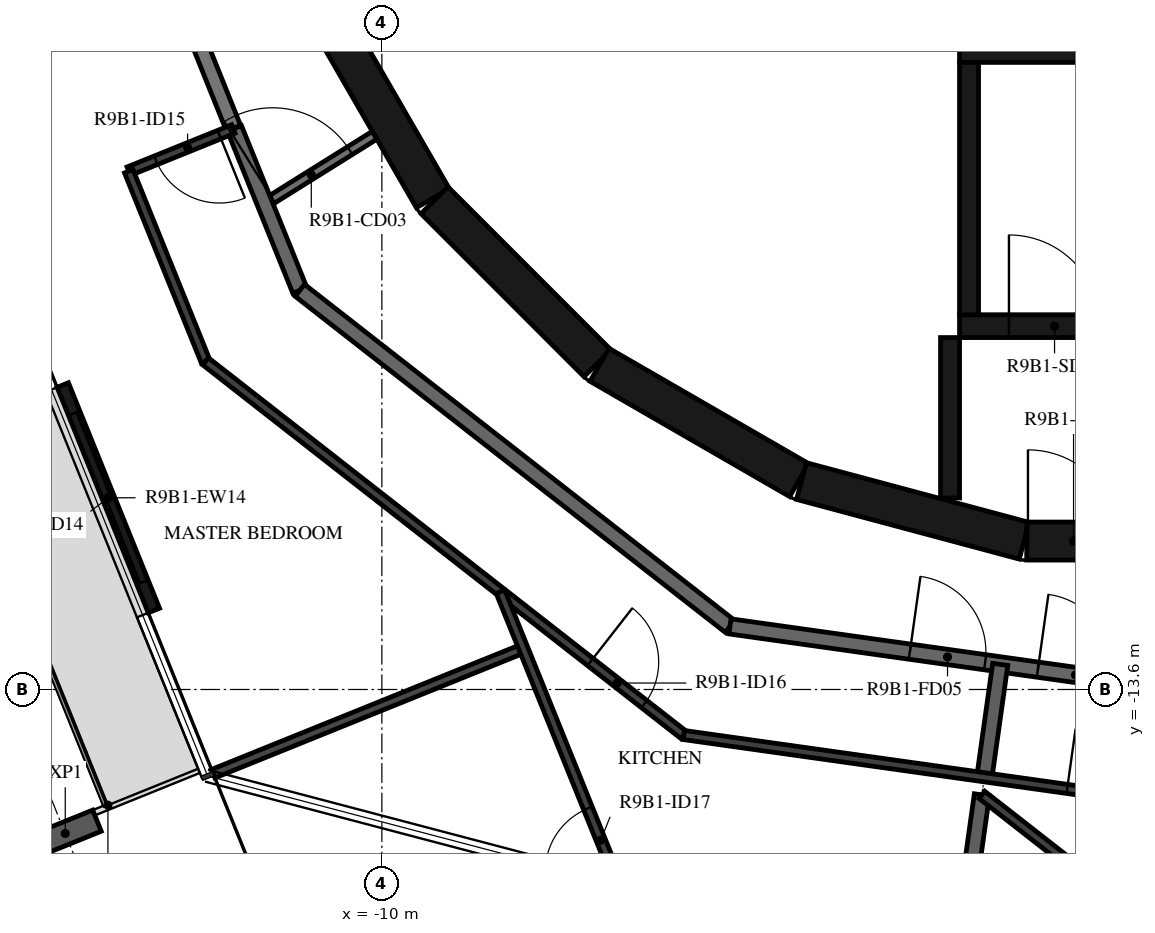
"""IFC4 building model, lengths in metres.
Left out: names, types, materials, properties, quantities, classifications, styles, units other than length and angle.
Written with IfcOpenShell. Run it as: python <this file> out.ifc"""

import sys

from ifc_helpers import new_model, si_unit, direction, frame, frame_2d, origin, origin_2d, place, context, subcontext, project, spatial, rectangle, i_section, extrude, element, fill, save


model = new_model("IFC4")
c1 = context("Model", 3, precision=1e-05, world=origin(), true_north=direction((0.0, 1.0)))
c2 = subcontext(c1, "Body", "Model", "MODEL_VIEW")
j1 = project(units=[si_unit("LENGTHUNIT", "METRE"), si_unit("PLANEANGLEUNIT", "RADIAN")], contexts=[c1])
p1 = place(None, origin())
s1 = spatial("IfcSite", under=j1, at=p1, CompositionType="ELEMENT")
p2 = place(p1, origin())
s2 = spatial("IfcBuilding", under=s1, at=p2, CompositionType="ELEMENT")
p3 = place(p2, frame((0.0, 0.0, 350.5)))
s3 = spatial("IfcBuildingStorey", under=s2, at=p3, CompositionType="ELEMENT", Elevation=350.5)
p4 = place(p3, frame((-14.166, -15.495, -0.38), z_axis=(0.0, 0.0, 1.0), x_axis=(-0.374606892434, 0.927183733755, 0.0)))
e1 = element("IfcColumn", 1, at=p4, inside=s3, PredefinedType="COLUMN", context=c2, shape_type="SweptSolid", body=[
    extrude(i_section(OverallWidth=0.3, OverallDepth=0.9, WebThickness=0.019, FlangeThickness=0.035, FilletRadius=0.03, at=origin_2d()), origin(), (0.0, 0.0, 1.0), 3.5),
])
p5 = place(p3, frame((-14.198, -9.594, 0.0), z_axis=(0.0, 0.0, 1.0), x_axis=(0.374624519695, -0.927176611678, 0.0)))
e2 = element("IfcWall", 2, at=p5, inside=s3, PredefinedType="STANDARD", context=c2, shape_type="SweptSolid", body=[
    extrude(rectangle(XDim=3.2, YDim=0.16, at=frame_2d((1.6, 0.0))), origin(), (0.0, 0.0, 1.0), 3.12),
])
p6 = place(p5, frame((0.4, 0.0, 0.0)))
e3 = element("IfcOpeningElement", 3, at=p6, cuts=e2, PredefinedType="OPENING", context=c2, shape_type="SweptSolid", body=[
    extrude(rectangle(XDim=2.4, YDim=2.4, at=frame_2d((1.2, 1.2))), frame((0.0, 0.09, 0.0), z_axis=(0.0, -1.0, 0.0), x_axis=(1.0, 0.0, 0.0)), (0.0, 0.0, 1.0), 0.18),
])
p7 = place(p3, frame((-10.845, -4.51, 0.0), z_axis=(0.0, 0.0, 1.0), x_axis=(0.500087131594, -0.865975092491, 0.0)))
e4 = element("IfcWall", 4, at=p7, inside=s3, PredefinedType="SHEAR", context=c2, shape_type="SweptSolid", body=[
    extrude(rectangle(XDim=3.033, YDim=0.5, at=frame_2d((1.516, 0.0))), origin(), (0.0, 0.0, 1.0), 3.12),
])
p8 = place(p3, frame((-9.308, -7.164, 0.0), z_axis=(0.0, 0.0, 1.0), x_axis=(0.707106781187, -0.707106781187, 0.0)))
e5 = element("IfcWall", 5, at=p8, inside=s3, PredefinedType="SHEAR", context=c2, shape_type="SweptSolid", body=[
    extrude(rectangle(XDim=3.032, YDim=0.5, at=frame_2d((1.516, 0.0))), origin(), (0.0, 0.0, 1.0), 3.12),
])
for number, where, z_axis, x_axis in (
    (6, (-7.137, -9.329, 0.0), (0.0, 0.0, 1.0), (0.866, -0.5, 0.0)),
    (7, (-4.479, -10.858, 0.0), (0.0, 0.0, 1.0), (0.966, -0.259, 0.0)),
):
    element("IfcWall", number, at=place(p3, frame(where, z_axis=z_axis, x_axis=x_axis)), inside=s3, PredefinedType="SHEAR", context=c2, shape_type="SweptSolid", body=[
        extrude(rectangle(XDim=3.033, YDim=0.5, at=frame_2d((1.516, 0.0))), origin(), (0.0, 0.0, 1.0), 3.12),
    ])
p9 = place(p3, frame((-1.516, -11.647, 0.0), z_axis=(0.0, 0.0, 1.0), x_axis=(1.0, 0.0, 0.0)))
e8 = element("IfcWall", 8, at=p9, inside=s3, PredefinedType="SHEAR", context=c2, shape_type="SweptSolid", body=[
    extrude(rectangle(XDim=3.033, YDim=0.5, at=frame_2d((1.516, 0.0))), origin(), (0.0, 0.0, 1.0), 3.12),
])
p10 = place(p9, frame((0.016, 0.0, 0.0)))
e9 = element("IfcOpeningElement", 9, at=p10, cuts=e8, PredefinedType="OPENING", context=c2, shape_type="SweptSolid", body=[
    extrude(rectangle(XDim=1.2, YDim=2.1, at=frame_2d((0.6, 1.05))), frame((0.0, 0.26, 0.0), z_axis=(0.0, -1.0, 0.0), x_axis=(1.0, 0.0, 0.0)), (0.0, 0.0, 1.0), 0.52),
])
p11 = place(p3, frame((-2.275, -8.67, 0.0), z_axis=(0.0, 0.0, 1.0), x_axis=(0.0, 1.0, 0.0)))
e10 = element("IfcWall", 10, at=p11, inside=s3, PredefinedType="SHEAR", context=c2, shape_type="SweptSolid", body=[
    extrude(rectangle(XDim=3.32, YDim=0.25, at=frame_2d((1.66, 0.0))), origin(), (0.0, 0.0, 1.0), 3.12),
])
p12 = place(p3, frame((-2.4, -5.2, 0.0), z_axis=(0.0, 0.0, 1.0), x_axis=(1.0, 0.0, 0.0)))
e11 = element("IfcWall", 11, at=p12, inside=s3, PredefinedType="SHEAR", context=c2, shape_type="SweptSolid", body=[
    extrude(rectangle(XDim=7.05, YDim=0.3, at=frame_2d((3.525, 0.0))), origin(), (0.0, 0.0, 1.0), 3.12),
])
p13 = place(p3, frame((-2.4, -8.82, 0.0), z_axis=(0.0, 0.0, 1.0), x_axis=(1.0, 0.0, 0.0)))
e12 = element("IfcWall", 12, at=p13, inside=s3, PredefinedType="SHEAR", context=c2, shape_type="SweptSolid", body=[
    extrude(rectangle(XDim=2.5, YDim=0.3, at=frame_2d((1.25, 0.0))), origin(), (0.0, 0.0, 1.0), 3.12),
])
p14 = place(p13, frame((0.65, 0.0, 0.0)))
e13 = element("IfcOpeningElement", 13, at=p14, cuts=e12, PredefinedType="OPENING", context=c2, shape_type="SweptSolid", body=[
    extrude(rectangle(XDim=1.2, YDim=2.1, at=frame_2d((0.6, 1.05))), frame((0.0, 0.16, 0.0), z_axis=(0.0, -1.0, 0.0), x_axis=(1.0, 0.0, 0.0)), (0.0, 0.0, 1.0), 0.32),
])
p15 = place(p3, frame((-2.525, -8.97, 0.0), z_axis=(0.0, 0.0, 1.0), x_axis=(0.0, -1.0, 0.0)))
e14 = element("IfcWall", 14, at=p15, inside=s3, PredefinedType="SHEAR", context=c2, shape_type="SweptSolid", body=[
    extrude(rectangle(XDim=2.11, YDim=0.25, at=frame_2d((1.055, 0.0))), origin(), (0.0, 0.0, 1.0), 3.12),
])
p16 = place(p3, frame((-11.539, -7.21, 0.0), z_axis=(0.0, 0.0, 1.0), x_axis=(0.848103039868, 0.529831325769, 0.0)))
e15 = element("IfcWall", 15, at=p16, inside=s3, PredefinedType="PARTITIONING", context=c2, shape_type="SweptSolid", body=[
    extrude(rectangle(XDim=1.702, YDim=0.12, at=frame_2d((0.851, 0.0))), origin(), (0.0, 0.0, 1.0), 3.12),
])
p17 = place(p16, frame((0.12, 0.0, 0.0)))
e16 = element("IfcOpeningElement", 16, at=p17, cuts=e15, PredefinedType="OPENING", context=c2, shape_type="SweptSolid", body=[
    extrude(rectangle(XDim=1.2, YDim=2.1, at=frame_2d((0.6, 1.05))), frame((0.0, 0.07, 0.0), z_axis=(0.0, -1.0, 0.0), x_axis=(1.0, 0.0, 0.0)), (0.0, 0.0, 1.0), 0.14),
])
p18 = place(p3, frame((-13.769, -1.691, 0.0), z_axis=(0.0, 0.0, 1.0), x_axis=(0.372720094028, -0.927943819155, 0.0)))
e17 = element("IfcWall", 17, at=p18, inside=s3, PredefinedType="STANDARD", context=c2, shape_type="SweptSolid", body=[
    extrude(rectangle(XDim=4.875, YDim=0.2, at=frame_2d((2.438, 0.0))), origin(), (0.0, 0.0, 1.0), 3.12),
])
p19 = place(p3, frame((-11.939, -6.22, 0.0), z_axis=(0.0, 0.0, 1.0), x_axis=(0.374651128394, -0.927165860024, 0.0)))
e18 = element("IfcWall", 18, at=p19, inside=s3, PredefinedType="STANDARD", context=c2, shape_type="SweptSolid", body=[
    extrude(rectangle(XDim=2.296, YDim=0.2, at=frame_2d((1.148, 0.0))), origin(), (0.0, 0.0, 1.0), 3.12),
])
p20 = place(p3, frame((-11.079, -8.349, 0.0), z_axis=(0.0, 0.0, 1.0), x_axis=(0.78800478687, -0.615669112324, 0.0)))
e19 = element("IfcWall", 19, at=p20, inside=s3, PredefinedType="STANDARD", context=c2, shape_type="SweptSolid", body=[
    extrude(rectangle(XDim=7.181, YDim=0.2, at=frame_2d((3.591, 0.0))), origin(), (0.0, 0.0, 1.0), 3.12),
])
p21 = place(p3, frame((-5.42, -12.77, 0.0), z_axis=(0.0, 0.0, 1.0), x_axis=(0.990270565508, -0.139155334385, 0.0)))
e20 = element("IfcWall", 20, at=p21, inside=s3, PredefinedType="STANDARD", context=c2, shape_type="SweptSolid", body=[
    extrude(rectangle(XDim=7.181, YDim=0.2, at=frame_2d((3.59, 0.0))), origin(), (0.0, 0.0, 1.0), 3.12),
])
p22 = place(p21, frame((2.39, 0.0, 0.0)))
e21 = element("IfcOpeningElement", 21, at=p22, cuts=e20, PredefinedType="OPENING", context=c2, shape_type="SweptSolid", body=[
    extrude(rectangle(XDim=1.0, YDim=2.1, at=frame_2d((0.5, 1.05))), frame((0.0, 0.11, 0.0), z_axis=(0.0, -1.0, 0.0), x_axis=(1.0, 0.0, 0.0)), (0.0, 0.0, 1.0), 0.22),
])
p23 = place(p21, frame((4.091, 0.0, 0.0)))
e22 = element("IfcOpeningElement", 22, at=p23, cuts=e20, PredefinedType="OPENING", context=c2, shape_type="SweptSolid", body=[
    extrude(rectangle(XDim=1.0, YDim=2.1, at=frame_2d((0.5, 1.05))), frame((0.0, 0.11, 0.0), z_axis=(0.0, -1.0, 0.0), x_axis=(1.0, 0.0, 0.0)), (0.0, 0.0, 1.0), 0.22),
])
p24 = place(p3, frame((-2.073, -14.755, 0.0), z_axis=(0.0, 0.0, 1.0), x_axis=(0.139005431033, 0.990291618738, 0.0)))
e23 = element("IfcWall", 23, at=p24, inside=s3, PredefinedType="STANDARD", context=c2, shape_type="SweptSolid", body=[
    extrude(rectangle(XDim=1.5, YDim=0.2, at=frame_2d((0.75, 0.0))), origin(), (0.0, 0.0, 1.0), 3.12),
])
p25 = place(p3, frame((-2.256, -16.055, 0.0), z_axis=(0.0, 0.0, 1.0), x_axis=(0.139109268657, 0.990277037689, 0.0)))
e24 = element("IfcWall", 24, at=p25, inside=s3, PredefinedType="STANDARD", context=c2, shape_type="SweptSolid", body=[
    extrude(rectangle(XDim=1.079, YDim=0.2, at=frame_2d((0.54, 0.0))), origin(), (0.0, 0.0, 1.0), 3.12),
])
p26 = place(p3, frame((-11.953, -6.225, 0.0), z_axis=(0.0, 0.0, 1.0), x_axis=(-0.927144096717, -0.374704982518, 0.0)))
e25 = element("IfcWall", 25, at=p26, inside=s3, PredefinedType="PARTITIONING", context=c2, shape_type="SweptSolid", body=[
    extrude(rectangle(XDim=1.485, YDim=0.12, at=frame_2d((0.742, 0.0))), origin(), (0.0, 0.0, 1.0), 3.12),
])
p27 = place(p26, frame((0.2, 0.0, 0.0)))
e26 = element("IfcOpeningElement", 26, at=p27, cuts=e25, PredefinedType="OPENING", context=c2, shape_type="SweptSolid", body=[
    extrude(rectangle(XDim=0.9, YDim=2.1, at=frame_2d((0.45, 1.05))), frame((0.0, 0.07, 0.0), z_axis=(0.0, -1.0, 0.0), x_axis=(1.0, 0.0, 0.0)), (0.0, 0.0, 1.0), 0.14),
])
p28 = place(p3, frame((-13.33, -6.782, 0.0), z_axis=(0.0, 0.0, 1.0), x_axis=(0.374602180132, -0.927185637637, 0.0)))
e27 = element("IfcWall", 27, at=p28, inside=s3, PredefinedType="PARTITIONING", context=c2, shape_type="SweptSolid", body=[
    extrude(rectangle(XDim=2.698, YDim=0.12, at=frame_2d((1.349, 0.0))), origin(), (0.0, 0.0, 1.0), 3.12),
])
p29 = place(p3, frame((-12.319, -9.283, 0.0), z_axis=(0.0, 0.0, 1.0), x_axis=(0.788000268464, -0.61567489546, 0.0)))
e28 = element("IfcWall", 28, at=p29, inside=s3, PredefinedType="PARTITIONING", context=c2, shape_type="SweptSolid", body=[
    extrude(rectangle(XDim=7.985, YDim=0.12, at=frame_2d((3.992, 0.0))), origin(), (0.0, 0.0, 1.0), 3.12),
])
p30 = place(p29, frame((6.423, 0.0, 0.0)))
e29 = element("IfcOpeningElement", 29, at=p30, cuts=e28, PredefinedType="OPENING", context=c2, shape_type="SweptSolid", body=[
    extrude(rectangle(XDim=0.9, YDim=2.1, at=frame_2d((0.45, 1.05))), frame((0.0, 0.07, 0.0), z_axis=(0.0, -1.0, 0.0), x_axis=(1.0, 0.0, 0.0)), (0.0, 0.0, 1.0), 0.14),
])
p31 = place(p3, frame((-6.027, -14.199, 0.0), z_axis=(0.0, 0.0, 1.0), x_axis=(0.990271617837, -0.139147845494, 0.0)))
e30 = element("IfcWall", 30, at=p31, inside=s3, PredefinedType="PARTITIONING", context=c2, shape_type="SweptSolid", body=[
    extrude(rectangle(XDim=7.308, YDim=0.12, at=frame_2d((3.654, 0.0))), origin(), (0.0, 0.0, 1.0), 3.12),
])
p32 = place(p31, frame((5.093, 0.0, 0.0)))
e31 = element("IfcOpeningElement", 31, at=p32, cuts=e30, PredefinedType="OPENING", context=c2, shape_type="SweptSolid", body=[
    extrude(rectangle(XDim=0.8, YDim=2.1, at=frame_2d((0.4, 1.05))), frame((0.0, 0.07, 0.0), z_axis=(0.0, -1.0, 0.0), x_axis=(1.0, 0.0, 0.0)), (0.0, 0.0, 1.0), 0.14),
])
p33 = place(p3, frame((-12.219, -14.708, 0.0), z_axis=(0.0, 0.0, 1.0), x_axis=(0.927189216671, 0.374593321469, 0.0)))
e32 = element("IfcWall", 32, at=p33, inside=s3, PredefinedType="PARTITIONING", context=c2, shape_type="SweptSolid", body=[
    extrude(rectangle(XDim=4.4, YDim=0.12, at=frame_2d((2.2, 0.0))), origin(), (0.0, 0.0, 1.0), 2.73),
])
p34 = place(p3, frame((-5.894, -18.616, 0.0), z_axis=(0.0, 0.0, 1.0), x_axis=(-0.374596683143, 0.927187858515, 0.0)))
e33 = element("IfcWall", 33, at=p34, inside=s3, PredefinedType="PARTITIONING", context=c2, shape_type="SweptSolid", body=[
    extrude(rectangle(XDim=6.796, YDim=0.12, at=frame_2d((3.398, 0.0))), origin(), (0.0, 0.0, 1.0), 3.12),
])
p35 = place(p34, frame((2.822, 0.0, 0.0)))
e34 = element("IfcOpeningElement", 34, at=p35, cuts=e33, PredefinedType="OPENING", context=c2, shape_type="SweptSolid", body=[
    extrude(rectangle(XDim=0.9, YDim=2.1, at=frame_2d((0.45, 1.05))), frame((0.0, 0.07, 0.0), z_axis=(0.0, -1.0, 0.0), x_axis=(1.0, 0.0, 0.0)), (0.0, 0.0, 1.0), 0.14),
])
p36 = place(p3, frame((2.363, -18.478, 0.0), z_axis=(0.0, 0.0, 1.0), x_axis=(-0.788010669333, 0.615661583191, 0.0)))
e35 = element("IfcWall", 35, at=p36, inside=s3, PredefinedType="PARTITIONING", context=c2, shape_type="SweptSolid", body=[
    extrude(rectangle(XDim=5.672, YDim=0.12, at=frame_2d((2.836, 0.0))), origin(), (0.0, 0.0, 1.0), 3.12),
])
p37 = place(p6, origin())
e36 = element("IfcDoor", 36, at=p37, inside=s3, OperationType="DOUBLE_DOOR_SLIDING", PredefinedType="DOOR", context=c2, shape_type="SweptSolid", body=[
    extrude(rectangle(XDim=2.4, YDim=2.4, at=frame_2d((1.2, 1.2))), frame((0.0, 0.025, 0.0), z_axis=(0.0, -1.0, 0.0), x_axis=(1.0, 0.0, 0.0)), (0.0, 0.0, 1.0), 0.05),
])
fill(e3, e36)
p38 = place(p14, origin())
e37 = element("IfcDoor", 37, at=p38, inside=s3, OperationType="SINGLE_SWING_LEFT", PredefinedType="DOOR", context=c2, shape_type="SweptSolid", body=[
    extrude(rectangle(XDim=1.2, YDim=2.1, at=frame_2d((0.6, 1.05))), frame((0.0, 0.025, 0.0), z_axis=(0.0, -1.0, 0.0), x_axis=(1.0, 0.0, 0.0)), (0.0, 0.0, 1.0), 0.05),
])
fill(e13, e37)
p39 = place(p10, origin())
e38 = element("IfcDoor", 38, at=p39, inside=s3, OperationType="SINGLE_SWING_RIGHT", PredefinedType="DOOR", context=c2, shape_type="SweptSolid", body=[
    extrude(rectangle(XDim=1.2, YDim=2.1, at=frame_2d((0.6, 1.05))), frame((0.0, 0.025, 0.0), z_axis=(0.0, -1.0, 0.0), x_axis=(1.0, 0.0, 0.0)), (0.0, 0.0, 1.0), 0.05),
])
fill(e9, e38)
p40 = place(p22, origin())
e39 = element("IfcDoor", 39, at=p40, inside=s3, OperationType="SINGLE_SWING_RIGHT", PredefinedType="DOOR", context=c2, shape_type="SweptSolid", body=[
    extrude(rectangle(XDim=1.0, YDim=2.1, at=frame_2d((0.5, 1.05))), frame((0.0, 0.025, 0.0), z_axis=(0.0, -1.0, 0.0), x_axis=(1.0, 0.0, 0.0)), (0.0, 0.0, 1.0), 0.05),
])
fill(e21, e39)
p41 = place(p27, origin())
e40 = element("IfcDoor", 40, at=p41, inside=s3, OperationType="SINGLE_SWING_LEFT", PredefinedType="DOOR", context=c2, shape_type="SweptSolid", body=[
    extrude(rectangle(XDim=0.9, YDim=2.1, at=frame_2d((0.45, 1.05))), frame((0.0, 0.025, 0.0), z_axis=(0.0, -1.0, 0.0), x_axis=(1.0, 0.0, 0.0)), (0.0, 0.0, 1.0), 0.05),
])
fill(e26, e40)
p42 = place(p30, origin())
e41 = element("IfcDoor", 41, at=p42, inside=s3, OperationType="SINGLE_SWING_RIGHT", PredefinedType="DOOR", context=c2, shape_type="SweptSolid", body=[
    extrude(rectangle(XDim=0.9, YDim=2.1, at=frame_2d((0.45, 1.05))), frame((0.0, 0.025, 0.0), z_axis=(0.0, -1.0, 0.0), x_axis=(1.0, 0.0, 0.0)), (0.0, 0.0, 1.0), 0.05),
])
fill(e29, e41)
p43 = place(p35, origin())
e42 = element("IfcDoor", 42, at=p43, inside=s3, OperationType="SINGLE_SWING_RIGHT", PredefinedType="DOOR", context=c2, shape_type="SweptSolid", body=[
    extrude(rectangle(XDim=0.9, YDim=2.1, at=frame_2d((0.45, 1.05))), frame((0.0, 0.025, 0.0), z_axis=(0.0, -1.0, 0.0), x_axis=(1.0, 0.0, 0.0)), (0.0, 0.0, 1.0), 0.05),
])
fill(e34, e42)
p44 = place(p23, origin())
e43 = element("IfcDoor", 43, at=p44, inside=s3, OperationType="SINGLE_SWING_RIGHT", PredefinedType="DOOR", context=c2, shape_type="SweptSolid", body=[
    extrude(rectangle(XDim=1.0, YDim=2.1, at=frame_2d((0.5, 1.05))), frame((0.0, 0.025, 0.0), z_axis=(0.0, -1.0, 0.0), x_axis=(1.0, 0.0, 0.0)), (0.0, 0.0, 1.0), 0.05),
])
fill(e22, e43)
p45 = place(p32, origin())
e44 = element("IfcDoor", 44, at=p45, inside=s3, OperationType="SINGLE_SWING_LEFT", PredefinedType="DOOR", context=c2, shape_type="SweptSolid", body=[
    extrude(rectangle(XDim=0.8, YDim=2.1, at=frame_2d((0.4, 1.05))), frame((0.0, 0.025, 0.0), z_axis=(0.0, -1.0, 0.0), x_axis=(1.0, 0.0, 0.0)), (0.0, 0.0, 1.0), 0.05),
])
fill(e31, e44)
p46 = place(p17, origin())
e45 = element("IfcDoor", 45, at=p46, inside=s3, OperationType="DOUBLE_DOOR_SINGLE_SWING", PredefinedType="DOOR", context=c2, shape_type="SweptSolid", body=[
    extrude(rectangle(XDim=1.2, YDim=2.1, at=frame_2d((0.6, 1.05))), frame((0.0, 0.025, 0.0), z_axis=(0.0, -1.0, 0.0), x_axis=(1.0, 0.0, 0.0)), (0.0, 0.0, 1.0), 0.05),
])
fill(e16, e45)
save(model, sys.argv[1])
